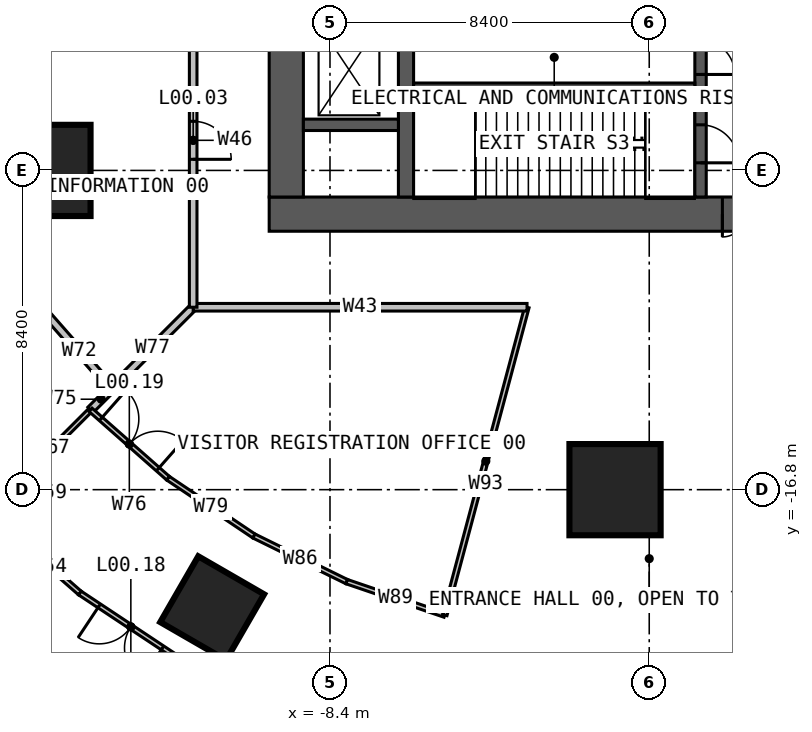
"""IFC4 building model, lengths in metres.
Left out: names, types, materials, properties, quantities, classifications, styles, units other than length and angle.
Written with IfcOpenShell. Run it as: python <this file> out.ifc"""

import sys

from ifc_helpers import new_model, si_unit, direction, frame, frame_2d, origin, origin_2d, place, context, subcontext, project, spatial, rectangle, hollow_rectangle, extrude, element, fill, save


model = new_model("IFC4")
c1 = context("Model", 3, precision=1e-05, world=origin(), true_north=direction((0.0, 1.0)))
c2 = subcontext(c1, "Body", "Model", "MODEL_VIEW")
j1 = project(units=[si_unit("LENGTHUNIT", "METRE"), si_unit("PLANEANGLEUNIT", "RADIAN")], contexts=[c1])
p1 = place(None, origin())
s1 = spatial("IfcSite", under=j1, at=p1, CompositionType="ELEMENT")
p2 = place(p1, origin())
s2 = spatial("IfcBuilding", under=s1, at=p2, CompositionType="ELEMENT")
p3 = place(p2, origin())
s3 = spatial("IfcBuildingStorey", under=s2, at=p3, CompositionType="ELEMENT", Elevation=0.0)
for number, where, z_axis, x_axis in (
    (1, (-15.9, -8.4, 0.0), (0.0, 0.0, 1.0), (1.0, 0.0, 0.0)),
    (2, (-0.9, -16.8, 0.0), (0.0, 0.0, 1.0), (1.0, 0.0, 0.0)),
):
    element("IfcColumn", number, at=place(p3, frame(where, z_axis=z_axis, x_axis=x_axis)), inside=s3, PredefinedType="COLUMN", context=c2, shape_type="SweptSolid", body=[
        extrude(rectangle(XDim=2.4, YDim=2.4, at=origin_2d()), origin(), (0.0, 0.0, 1.0), 6.0),
    ])
p4 = place(p3, frame((-11.5, -19.919, 0.0), z_axis=(0.0, 0.0, 1.0), x_axis=(-0.5, -0.866025403784, 0.0)))
e3 = element("IfcColumn", 3, at=p4, inside=s3, PredefinedType="COLUMN", context=c2, shape_type="SweptSolid", body=[
    extrude(hollow_rectangle(XDim=2.0, YDim=2.0, WallThickness=0.24, at=origin_2d()), origin(), (0.0, 0.0, 1.0), 6.0),
])
p5 = place(p3, frame((10.0, -9.55, 0.0), z_axis=(0.0, 0.0, 1.0), x_axis=(-1.0, 0.0, 0.0)))
e4 = element("IfcWall", 4, at=p5, inside=s3, PredefinedType="SOLIDWALL", context=c2, shape_type="SweptSolid", body=[
    extrude(rectangle(XDim=20.0, YDim=0.9, at=frame_2d((10.0, 0.0))), origin(), (0.0, 0.0, 1.0), 6.0),
])
p6 = place(p5, frame((6.875, 0.0, 0.0)))
e5 = element("IfcOpeningElement", 5, at=p6, cuts=e4, PredefinedType="OPENING", context=c2, shape_type="SweptSolid", body=[
    extrude(rectangle(XDim=1.2, YDim=2.2, at=frame_2d((0.6, 1.1))), frame((0.0, 0.46, 0.0), z_axis=(0.0, -1.0, 0.0), x_axis=(1.0, 0.0, 0.0)), (0.0, 0.0, 1.0), 0.92),
])
p7 = place(p3, frame((-9.55, 9.1, 0.0), z_axis=(0.0, 0.0, 1.0), x_axis=(0.0, -1.0, 0.0)))
e6 = element("IfcWall", 6, at=p7, inside=s3, PredefinedType="SOLIDWALL", context=c2, shape_type="SweptSolid", body=[
    extrude(rectangle(XDim=18.2, YDim=0.9, at=frame_2d((9.1, 0.0))), origin(), (0.0, 0.0, 1.0), 6.0),
])
p8 = place(p7, frame((6.2, 0.0, 0.0)))
e7 = element("IfcOpeningElement", 7, at=p8, cuts=e6, PredefinedType="OPENING", context=c2, shape_type="SweptSolid", body=[
    extrude(rectangle(XDim=1.0, YDim=2.2, at=frame_2d((0.5, 1.1))), frame((0.0, 0.46, 0.0), z_axis=(0.0, -1.0, 0.0), x_axis=(1.0, 0.0, 0.0)), (0.0, 0.0, 1.0), 0.92),
])
p9 = place(p3, frame((-6.4, -9.1, 0.0), z_axis=(0.0, 0.0, 1.0), x_axis=(0.0, 1.0, 0.0)))
e8 = element("IfcWall", 8, at=p9, inside=s3, PredefinedType="SOLIDWALL", context=c2, shape_type="SweptSolid", body=[
    extrude(rectangle(XDim=18.2, YDim=0.4, at=frame_2d((9.1, 0.0))), origin(), (0.0, 0.0, 1.0), 6.0),
])
p10 = place(p9, frame((8.6, 0.0, 0.0)))
e9 = element("IfcOpeningElement", 9, at=p10, cuts=e8, PredefinedType="OPENING", context=c2, shape_type="SweptSolid", body=[
    extrude(rectangle(XDim=1.0, YDim=2.2, at=frame_2d((0.5, 1.1))), frame((0.0, 0.21, 0.0), z_axis=(0.0, -1.0, 0.0), x_axis=(1.0, 0.0, 0.0)), (0.0, 0.0, 1.0), 0.42),
])
p11 = place(p3, frame((1.35, -1.45, 0.0), z_axis=(0.0, 0.0, 1.0), x_axis=(0.0, -1.0, 0.0)))
e10 = element("IfcWall", 10, at=p11, inside=s3, PredefinedType="SOLIDWALL", context=c2, shape_type="SweptSolid", body=[
    extrude(rectangle(XDim=7.65, YDim=0.3, at=frame_2d((3.825, 0.0))), origin(), (0.0, 0.0, 1.0), 6.0),
])
p12 = place(p11, frame((5.75, 0.0, 0.0)))
e11 = element("IfcOpeningElement", 11, at=p12, cuts=e10, PredefinedType="OPENING", context=c2, shape_type="SweptSolid", body=[
    extrude(rectangle(XDim=1.0, YDim=2.2, at=frame_2d((0.5, 1.1))), frame((0.0, 0.16, 0.0), z_axis=(0.0, -1.0, 0.0), x_axis=(1.0, 0.0, 0.0)), (0.0, 0.0, 1.0), 0.32),
])
p13 = place(p11, frame((3.525, 0.0, 0.0)))
e12 = element("IfcOpeningElement", 12, at=p13, cuts=e10, PredefinedType="OPENING", context=c2, shape_type="SweptSolid", body=[
    extrude(rectangle(XDim=0.9, YDim=2.2, at=frame_2d((0.45, 1.1))), frame((0.0, 0.16, 0.0), z_axis=(0.0, -1.0, 0.0), x_axis=(1.0, 0.0, 0.0)), (0.0, 0.0, 1.0), 0.32),
])
p14 = place(p3, frame((-6.2, -6.2, 0.0), z_axis=(0.0, 0.0, 1.0), x_axis=(1.0, 0.0, 0.0)))
e13 = element("IfcWall", 13, at=p14, inside=s3, PredefinedType="SOLIDWALL", context=c2, shape_type="SweptSolid", body=[
    extrude(rectangle(XDim=7.4, YDim=0.2, at=frame_2d((3.7, 0.0))), origin(), (0.0, 0.0, 1.0), 6.0),
])
p15 = place(p3, frame((-9.1, -7.2, 0.0), z_axis=(0.0, 0.0, 1.0), x_axis=(1.0, 0.0, 0.0)))
e14 = element("IfcWall", 14, at=p15, inside=s3, PredefinedType="SOLIDWALL", context=c2, shape_type="SweptSolid", body=[
    extrude(rectangle(XDim=2.5, YDim=0.3, at=frame_2d((1.25, 0.0))), origin(), (0.0, 0.0, 1.0), 6.0),
])
p16 = place(p3, frame((-16.57, -18.127, 0.0), z_axis=(0.0, 0.0, 1.0), x_axis=(0.752226011438, -0.658905173538, 0.0)))
e15 = element("IfcWall", 15, at=p16, inside=s3, PredefinedType="PARTITIONING", context=c2, shape_type="SweptSolid", body=[
    extrude(rectangle(XDim=2.114, YDim=0.12, at=frame_2d((1.057, 0.0))), origin(), (0.0, 0.0, 1.0), 5.7),
])
p17 = place(p3, frame((-16.72, -16.72, 0.0), z_axis=(0.0, 0.0, 1.0), x_axis=(0.707106781187, 0.707106781187, 0.0)))
e16 = element("IfcWall", 16, at=p17, inside=s3, PredefinedType="PARTITIONING", context=c2, shape_type="SweptSolid", body=[
    extrude(rectangle(XDim=2.857, YDim=0.12, at=frame_2d((1.428, 0.0))), origin(), (0.0, 0.0, 1.0), 5.7),
])
p18 = place(p3, frame((-15.86, -12.18, 0.0), z_axis=(0.0, 0.0, 1.0), x_axis=(0.659643857667, -0.751578326618, 0.0)))
e17 = element("IfcWall", 17, at=p18, inside=s3, PredefinedType="PARTITIONING", context=c2, shape_type="SweptSolid", body=[
    extrude(rectangle(XDim=2.608, YDim=0.2, at=frame_2d((1.304, 0.0))), origin(), (0.0, 0.0, 1.0), 5.7),
])
p19 = place(p3, frame((-14.98, -19.52, 0.0), z_axis=(0.0, 0.0, 1.0), x_axis=(0.832994734858, -0.553280915719, 0.0)))
e18 = element("IfcWall", 18, at=p19, inside=s3, PredefinedType="PARTITIONING", context=c2, shape_type="SweptSolid", body=[
    extrude(rectangle(XDim=3.217, YDim=0.12, at=frame_2d((1.609, 0.0))), origin(), (0.0, 0.0, 1.0), 5.7),
])
p20 = place(p19, frame((0.609, 0.0, 0.0)))
e19 = element("IfcOpeningElement", 19, at=p20, cuts=e18, PredefinedType="OPENING", context=c2, shape_type="SweptSolid", body=[
    extrude(rectangle(XDim=2.0, YDim=2.4, at=frame_2d((1.0, 1.2))), frame((0.0, 0.07, 0.0), z_axis=(0.0, -1.0, 0.0), x_axis=(1.0, 0.0, 0.0)), (0.0, 0.0, 1.0), 0.14),
])
p21 = place(p3, frame((-14.7, -14.7, 0.0), z_axis=(0.0, 0.0, 1.0), x_axis=(0.707106781187, 0.707106781187, 0.0)))
e20 = element("IfcWall", 20, at=p21, inside=s3, PredefinedType="PARTITIONING", context=c2, shape_type="SweptSolid", body=[
    extrude(rectangle(XDim=0.792, YDim=0.2, at=frame_2d((0.396, 0.0))), origin(), (0.0, 0.0, 1.0), 5.7),
])
p22 = place(p3, frame((-14.7, -14.7, 0.0), z_axis=(0.0, 0.0, 1.0), x_axis=(0.7498352366, -0.661624605009, 0.0)))
e21 = element("IfcWall", 21, at=p22, inside=s3, PredefinedType="PARTITIONING", context=c2, shape_type="SweptSolid", body=[
    extrude(rectangle(XDim=2.721, YDim=0.12, at=frame_2d((1.36, 0.0))), origin(), (0.0, 0.0, 1.0), 5.7),
])
p23 = place(p22, frame((0.36, 0.0, 0.0)))
e22 = element("IfcOpeningElement", 22, at=p23, cuts=e21, PredefinedType="OPENING", context=c2, shape_type="SweptSolid", body=[
    extrude(rectangle(XDim=2.0, YDim=2.4, at=frame_2d((1.0, 1.2))), frame((0.0, 0.07, 0.0), z_axis=(0.0, -1.0, 0.0), x_axis=(1.0, 0.0, 0.0)), (0.0, 0.0, 1.0), 0.14),
])
p24 = place(p3, frame((-14.14, -14.14, 0.0), z_axis=(0.0, 0.0, 1.0), x_axis=(0.707106781187, 0.707106781187, 0.0)))
e23 = element("IfcWall", 23, at=p24, inside=s3, PredefinedType="PARTITIONING", context=c2, shape_type="SweptSolid", body=[
    extrude(rectangle(XDim=3.026, YDim=0.2, at=frame_2d((1.513, 0.0))), origin(), (0.0, 0.0, 1.0), 5.7),
])
p25 = place(p3, frame((-12.66, -16.5, 0.0), z_axis=(0.0, 0.0, 1.0), x_axis=(0.82978173513, -0.55808805044, 0.0)))
e24 = element("IfcWall", 24, at=p25, inside=s3, PredefinedType="PARTITIONING", context=c2, shape_type="SweptSolid", body=[
    extrude(rectangle(XDim=2.724, YDim=0.12, at=frame_2d((1.362, 0.0))), origin(), (0.0, 0.0, 1.0), 5.7),
])
p26 = place(p3, frame((-10.4, -18.02, 0.0), z_axis=(0.0, 0.0, 1.0), x_axis=(0.897352880703, -0.441313729103, 0.0)))
e25 = element("IfcWall", 25, at=p26, inside=s3, PredefinedType="PARTITIONING", context=c2, shape_type="SweptSolid", body=[
    extrude(rectangle(XDim=2.719, YDim=0.12, at=frame_2d((1.359, 0.0))), origin(), (0.0, 0.0, 1.0), 5.7),
])
p27 = place(p3, frame((-7.96, -19.22, 0.0), z_axis=(0.0, 0.0, 1.0), x_axis=(0.946448006399, -0.322856270162, 0.0)))
e26 = element("IfcWall", 26, at=p27, inside=s3, PredefinedType="PARTITIONING", context=c2, shape_type="SweptSolid", body=[
    extrude(rectangle(XDim=2.726, YDim=0.12, at=frame_2d((1.363, 0.0))), origin(), (0.0, 0.0, 1.0), 5.7),
])
p28 = place(p3, frame((-5.38, -20.1, 0.0), z_axis=(0.0, 0.0, 1.0), x_axis=(0.257649962154, 0.966238323087, 0.0)))
e27 = element("IfcWall", 27, at=p28, inside=s3, PredefinedType="PARTITIONING", context=c2, shape_type="SweptSolid", body=[
    extrude(rectangle(XDim=8.383, YDim=0.12, at=frame_2d((4.191, 0.0))), origin(), (0.0, 0.0, 1.0), 5.7),
])
p29 = place(p3, frame((-12.0, -12.0, 0.0), z_axis=(0.0, 0.0, 1.0), x_axis=(1.0, 0.0, 0.0)))
e28 = element("IfcWall", 28, at=p29, inside=s3, PredefinedType="PARTITIONING", context=c2, shape_type="SweptSolid", body=[
    extrude(rectangle(XDim=8.785, YDim=0.2, at=frame_2d((4.392, 0.0))), origin(), (0.0, 0.0, 1.0), 5.7),
])
p30 = place(p3, frame((-12.0, -3.215, 0.0), z_axis=(0.0, 0.0, 1.0), x_axis=(0.0, -1.0, 0.0)))
e29 = element("IfcWall", 29, at=p30, inside=s3, PredefinedType="PARTITIONING", context=c2, shape_type="SweptSolid", body=[
    extrude(rectangle(XDim=8.785, YDim=0.2, at=frame_2d((4.392, 0.0))), origin(), (0.0, 0.0, 1.0), 5.7),
])
p31 = place(p30, frame((3.892, 0.0, 0.0)))
e30 = element("IfcOpeningElement", 30, at=p31, cuts=e29, PredefinedType="OPENING", context=c2, shape_type="SweptSolid", body=[
    extrude(rectangle(XDim=1.0, YDim=2.2, at=frame_2d((0.5, 1.1))), frame((0.0, 0.11, 0.0), z_axis=(0.0, -1.0, 0.0), x_axis=(1.0, 0.0, 0.0)), (0.0, 0.0, 1.0), 0.22),
])
p32 = place(p6, origin())
e31 = element("IfcDoor", 31, at=p32, inside=s3, OperationType="DOUBLE_DOOR_SINGLE_SWING", PredefinedType="DOOR", context=c2, shape_type="SweptSolid", body=[
    extrude(rectangle(XDim=1.2, YDim=2.2, at=frame_2d((0.6, 1.1))), frame((0.0, 0.025, 0.0), z_axis=(0.0, -1.0, 0.0), x_axis=(1.0, 0.0, 0.0)), (0.0, 0.0, 1.0), 0.05),
])
fill(e5, e31)
p33 = place(p12, origin())
e32 = element("IfcDoor", 32, at=p33, inside=s3, OperationType="SINGLE_SWING_RIGHT", PredefinedType="DOOR", context=c2, shape_type="SweptSolid", body=[
    extrude(rectangle(XDim=1.0, YDim=2.2, at=frame_2d((0.5, 1.1))), frame((0.0, 0.025, 0.0), z_axis=(0.0, -1.0, 0.0), x_axis=(1.0, 0.0, 0.0)), (0.0, 0.0, 1.0), 0.05),
])
fill(e11, e32)
p34 = place(p13, origin())
e33 = element("IfcDoor", 33, at=p34, inside=s3, OperationType="SINGLE_SWING_RIGHT", PredefinedType="DOOR", context=c2, shape_type="SweptSolid", body=[
    extrude(rectangle(XDim=0.9, YDim=2.2, at=frame_2d((0.45, 1.1))), frame((0.0, 0.025, 0.0), z_axis=(0.0, -1.0, 0.0), x_axis=(1.0, 0.0, 0.0)), (0.0, 0.0, 1.0), 0.05),
])
fill(e12, e33)
p35 = place(p20, frame((2.0, 0.0, 0.0), z_axis=(0.0, 0.0, 1.0), x_axis=(-1.0, 0.0, 0.0)))
e34 = element("IfcDoor", 34, at=p35, inside=s3, OperationType="DOUBLE_DOOR_SINGLE_SWING", PredefinedType="DOOR", context=c2, shape_type="SweptSolid", body=[
    extrude(rectangle(XDim=2.0, YDim=2.4, at=frame_2d((1.0, 1.2))), frame((0.0, 0.025, 0.0), z_axis=(0.0, -1.0, 0.0), x_axis=(1.0, 0.0, 0.0)), (0.0, 0.0, 1.0), 0.05),
])
fill(e19, e34)
p36 = place(p23, origin())
e35 = element("IfcDoor", 35, at=p36, inside=s3, OperationType="DOUBLE_DOOR_SINGLE_SWING", PredefinedType="DOOR", context=c2, shape_type="SweptSolid", body=[
    extrude(rectangle(XDim=2.0, YDim=2.4, at=frame_2d((1.0, 1.2))), frame((0.0, 0.025, 0.0), z_axis=(0.0, -1.0, 0.0), x_axis=(1.0, 0.0, 0.0)), (0.0, 0.0, 1.0), 0.05),
])
fill(e22, e35)
p37 = place(p31, origin())
e36 = element("IfcDoor", 36, at=p37, inside=s3, OperationType="SINGLE_SWING_RIGHT", PredefinedType="DOOR", context=c2, shape_type="SweptSolid", body=[
    extrude(rectangle(XDim=1.0, YDim=2.2, at=frame_2d((0.5, 1.1))), frame((0.0, 0.025, 0.0), z_axis=(0.0, -1.0, 0.0), x_axis=(1.0, 0.0, 0.0)), (0.0, 0.0, 1.0), 0.05),
])
fill(e30, e36)
save(model, sys.argv[1])
